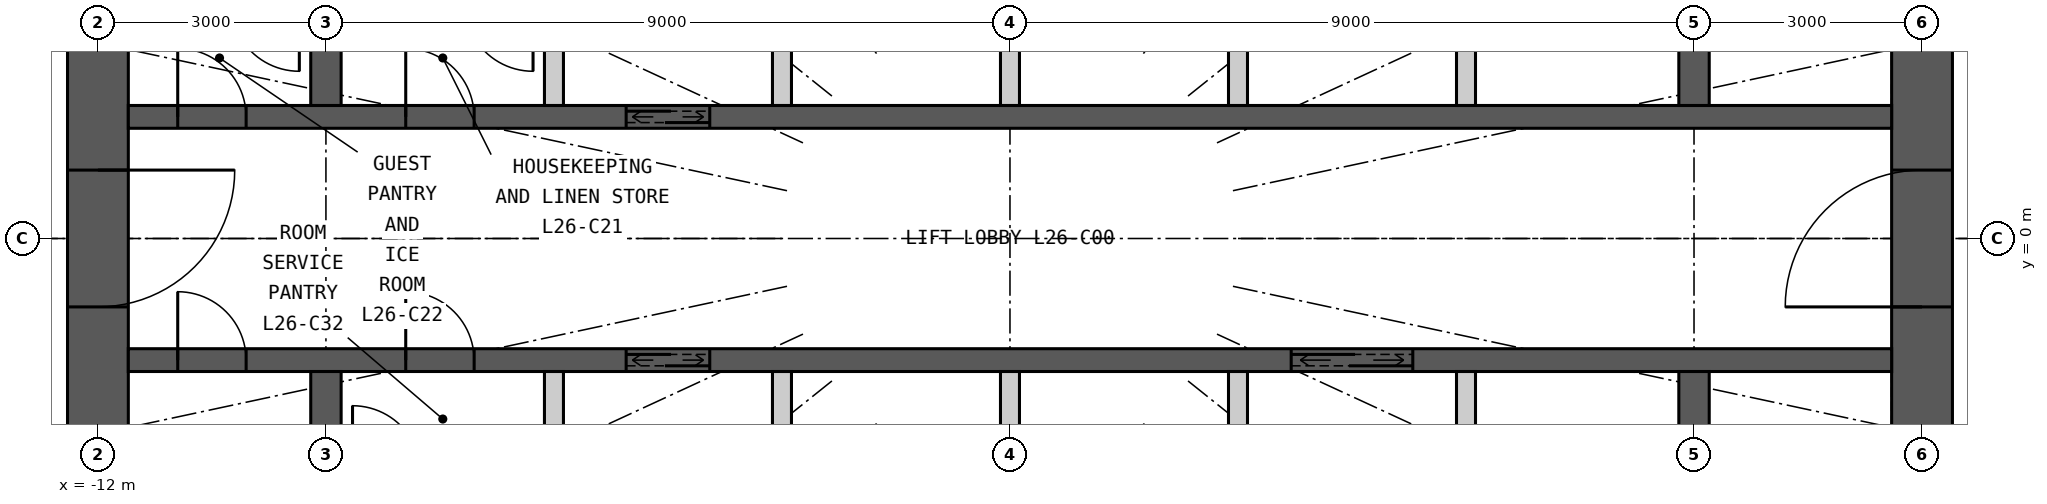
"""IFC4 building model, lengths in metres.
Left out: names, types, materials, properties, quantities, classifications, styles, units other than length and angle.
Written with IfcOpenShell. Run it as: python <this file> out.ifc"""

import sys

from ifc_helpers import new_model, si_unit, direction, frame, frame_2d, origin, place, context, subcontext, project, spatial, rectangle, extrude, element, fill, save


model = new_model("IFC4")
c1 = context("Model", 3, precision=1e-05, world=origin(), true_north=direction((0.0, 1.0)))
c2 = subcontext(c1, "Body", "Model", "MODEL_VIEW")
j1 = project(units=[si_unit("LENGTHUNIT", "METRE"), si_unit("PLANEANGLEUNIT", "RADIAN")], contexts=[c1])
p1 = place(None, origin())
s1 = spatial("IfcSite", under=j1, at=p1, CompositionType="ELEMENT")
p2 = place(p1, origin())
s2 = spatial("IfcBuilding", under=s1, at=p2, CompositionType="ELEMENT")
p3 = place(p2, frame((0.0, 0.0, 105.6)))
s3 = spatial("IfcBuildingStorey", under=s2, at=p3, CompositionType="ELEMENT", Elevation=105.6)
p4 = place(p3, frame((12.0, -7.6, 0.0), z_axis=(0.0, 0.0, 1.0), x_axis=(0.0, 1.0, 0.0)))
e1 = element("IfcWall", 1, at=p4, inside=s3, PredefinedType="SHEAR", context=c2, shape_type="SweptSolid", body=[
    extrude(rectangle(XDim=15.2, YDim=0.8, at=frame_2d((7.6, 0.0))), origin(), (0.0, 0.0, 1.0), 3.3),
])
p5 = place(p4, frame((6.7, 0.0, 0.0)))
e2 = element("IfcOpeningElement", 2, at=p5, cuts=e1, PredefinedType="OPENING", context=c2, shape_type="SweptSolid", body=[
    extrude(rectangle(XDim=1.8, YDim=2.2, at=frame_2d((0.9, 1.1))), frame((0.0, 0.41, 0.0), z_axis=(0.0, -1.0, 0.0), x_axis=(1.0, 0.0, 0.0)), (0.0, 0.0, 1.0), 0.82),
])
p6 = place(p3, frame((-12.0, 7.6, 0.0), z_axis=(0.0, 0.0, 1.0), x_axis=(0.0, -1.0, 0.0)))
e3 = element("IfcWall", 3, at=p6, inside=s3, PredefinedType="SHEAR", context=c2, shape_type="SweptSolid", body=[
    extrude(rectangle(XDim=15.2, YDim=0.8, at=frame_2d((7.6, 0.0))), origin(), (0.0, 0.0, 1.0), 3.3),
])
p7 = place(p6, frame((6.7, 0.0, 0.0)))
e4 = element("IfcOpeningElement", 4, at=p7, cuts=e3, PredefinedType="OPENING", context=c2, shape_type="SweptSolid", body=[
    extrude(rectangle(XDim=1.8, YDim=2.2, at=frame_2d((0.9, 1.1))), frame((0.0, 0.41, 0.0), z_axis=(0.0, -1.0, 0.0), x_axis=(1.0, 0.0, 0.0)), (0.0, 0.0, 1.0), 0.82),
])
p8 = place(p3, frame((-11.6, 1.6, 0.0), z_axis=(0.0, 0.0, 1.0), x_axis=(1.0, 0.0, 0.0)))
e5 = element("IfcWall", 5, at=p8, inside=s3, PredefinedType="SHEAR", context=c2, shape_type="SweptSolid", body=[
    extrude(rectangle(XDim=23.2, YDim=0.3, at=frame_2d((11.6, 0.0))), origin(), (0.0, 0.0, 1.0), 3.3),
])
p9 = place(p8, frame((6.55, 0.0, 0.0)))
e6 = element("IfcOpeningElement", 6, at=p9, cuts=e5, PredefinedType="OPENING", context=c2, shape_type="SweptSolid", body=[
    extrude(rectangle(XDim=1.1, YDim=2.2, at=frame_2d((0.55, 1.1))), frame((0.0, 0.16, 0.0), z_axis=(0.0, -1.0, 0.0), x_axis=(1.0, 0.0, 0.0)), (0.0, 0.0, 1.0), 0.32),
])
p10 = place(p8, frame((3.65, 0.0, 0.0)))
e7 = element("IfcOpeningElement", 7, at=p10, cuts=e5, PredefinedType="OPENING", context=c2, shape_type="SweptSolid", body=[
    extrude(rectangle(XDim=0.9, YDim=2.2, at=frame_2d((0.45, 1.1))), frame((0.0, 0.16, 0.0), z_axis=(0.0, -1.0, 0.0), x_axis=(1.0, 0.0, 0.0)), (0.0, 0.0, 1.0), 0.32),
])
p11 = place(p8, frame((0.65, 0.0, 0.0)))
e8 = element("IfcOpeningElement", 8, at=p11, cuts=e5, PredefinedType="OPENING", context=c2, shape_type="SweptSolid", body=[
    extrude(rectangle(XDim=0.9, YDim=2.2, at=frame_2d((0.45, 1.1))), frame((0.0, 0.16, 0.0), z_axis=(0.0, -1.0, 0.0), x_axis=(1.0, 0.0, 0.0)), (0.0, 0.0, 1.0), 0.32),
])
p12 = place(p3, frame((-11.6, -1.6, 0.0), z_axis=(0.0, 0.0, 1.0), x_axis=(1.0, 0.0, 0.0)))
e9 = element("IfcWall", 9, at=p12, inside=s3, PredefinedType="SHEAR", context=c2, shape_type="SweptSolid", body=[
    extrude(rectangle(XDim=23.2, YDim=0.3, at=frame_2d((11.6, 0.0))), origin(), (0.0, 0.0, 1.0), 3.3),
])
p13 = place(p12, frame((6.55, 0.0, 0.0)))
e10 = element("IfcOpeningElement", 10, at=p13, cuts=e9, PredefinedType="OPENING", context=c2, shape_type="SweptSolid", body=[
    extrude(rectangle(XDim=1.1, YDim=2.2, at=frame_2d((0.55, 1.1))), frame((0.0, 0.16, 0.0), z_axis=(0.0, -1.0, 0.0), x_axis=(1.0, 0.0, 0.0)), (0.0, 0.0, 1.0), 0.32),
])
p14 = place(p12, frame((15.3, 0.0, 0.0)))
e11 = element("IfcOpeningElement", 11, at=p14, cuts=e9, PredefinedType="OPENING", context=c2, shape_type="SweptSolid", body=[
    extrude(rectangle(XDim=1.6, YDim=2.4, at=frame_2d((0.8, 1.2))), frame((0.0, 0.16, 0.0), z_axis=(0.0, -1.0, 0.0), x_axis=(1.0, 0.0, 0.0)), (0.0, 0.0, 1.0), 0.32),
])
p15 = place(p12, frame((0.65, 0.0, 0.0)))
e12 = element("IfcOpeningElement", 12, at=p15, cuts=e9, PredefinedType="OPENING", context=c2, shape_type="SweptSolid", body=[
    extrude(rectangle(XDim=0.9, YDim=2.2, at=frame_2d((0.45, 1.1))), frame((0.0, 0.16, 0.0), z_axis=(0.0, -1.0, 0.0), x_axis=(1.0, 0.0, 0.0)), (0.0, 0.0, 1.0), 0.32),
])
p16 = place(p12, frame((3.65, 0.0, 0.0)))
e13 = element("IfcOpeningElement", 13, at=p16, cuts=e9, PredefinedType="OPENING", context=c2, shape_type="SweptSolid", body=[
    extrude(rectangle(XDim=0.9, YDim=2.2, at=frame_2d((0.45, 1.1))), frame((0.0, 0.16, 0.0), z_axis=(0.0, -1.0, 0.0), x_axis=(1.0, 0.0, 0.0)), (0.0, 0.0, 1.0), 0.32),
])
for number, where, z_axis, x_axis in (
    (14, (-9.0, 1.75, 0.0), (0.0, 0.0, 1.0), (0.0, 1.0, 0.0)),
    (15, (-9.0, -4.1, 0.0), (0.0, 0.0, 1.0), (0.0, 1.0, 0.0)),
    (16, (9.0, 1.75, 0.0), (0.0, 0.0, 1.0), (0.0, 1.0, 0.0)),
    (17, (9.0, -4.1, 0.0), (0.0, 0.0, 1.0), (0.0, 1.0, 0.0)),
):
    element("IfcWall", number, at=place(p3, frame(where, z_axis=z_axis, x_axis=x_axis)), inside=s3, PredefinedType="SHEAR", context=c2, shape_type="SweptSolid", body=[
        extrude(rectangle(XDim=2.35, YDim=0.4, at=frame_2d((1.175, 0.0))), origin(), (0.0, 0.0, 1.0), 3.3),
    ])
for number, where, z_axis, x_axis in (
    (18, (-6.0, 1.75, 0.0), (0.0, 0.0, 1.0), (0.0, 1.0, 0.0)),
    (19, (-3.0, 1.75, 0.0), (0.0, 0.0, 1.0), (0.0, 1.0, 0.0)),
    (20, (0.0, 1.75, 0.0), (0.0, 0.0, 1.0), (0.0, 1.0, 0.0)),
    (21, (3.0, 1.75, 0.0), (0.0, 0.0, 1.0), (0.0, 1.0, 0.0)),
    (22, (6.0, 1.75, 0.0), (0.0, 0.0, 1.0), (0.0, 1.0, 0.0)),
    (23, (-6.0, -4.1, 0.0), (0.0, 0.0, 1.0), (0.0, 1.0, 0.0)),
    (24, (-3.0, -4.1, 0.0), (0.0, 0.0, 1.0), (0.0, 1.0, 0.0)),
    (25, (0.0, -4.1, 0.0), (0.0, 0.0, 1.0), (0.0, 1.0, 0.0)),
    (26, (3.0, -4.1, 0.0), (0.0, 0.0, 1.0), (0.0, 1.0, 0.0)),
    (27, (6.0, -4.1, 0.0), (0.0, 0.0, 1.0), (0.0, 1.0, 0.0)),
):
    element("IfcWall", number, at=place(p3, frame(where, z_axis=z_axis, x_axis=x_axis)), inside=s3, PredefinedType="PARTITIONING", context=c2, shape_type="SweptSolid", body=[
        extrude(rectangle(XDim=2.35, YDim=0.25, at=frame_2d((1.175, 0.0))), origin(), (0.0, 0.0, 1.0), 3.3),
    ])
p17 = place(p9, origin())
e28 = element("IfcDoor", 28, at=p17, inside=s3, OperationType="DOUBLE_DOOR_SLIDING", PredefinedType="DOOR", context=c2, shape_type="SweptSolid", body=[
    extrude(rectangle(XDim=1.1, YDim=2.2, at=frame_2d((0.55, 1.1))), frame((0.0, 0.025, 0.0), z_axis=(0.0, -1.0, 0.0), x_axis=(1.0, 0.0, 0.0)), (0.0, 0.0, 1.0), 0.05),
])
fill(e6, e28)
p18 = place(p13, origin())
e29 = element("IfcDoor", 29, at=p18, inside=s3, OperationType="DOUBLE_DOOR_SLIDING", PredefinedType="DOOR", context=c2, shape_type="SweptSolid", body=[
    extrude(rectangle(XDim=1.1, YDim=2.2, at=frame_2d((0.55, 1.1))), frame((0.0, 0.025, 0.0), z_axis=(0.0, -1.0, 0.0), x_axis=(1.0, 0.0, 0.0)), (0.0, 0.0, 1.0), 0.05),
])
fill(e10, e29)
p19 = place(p14, origin())
e30 = element("IfcDoor", 30, at=p19, inside=s3, OperationType="DOUBLE_DOOR_SLIDING", PredefinedType="DOOR", context=c2, shape_type="SweptSolid", body=[
    extrude(rectangle(XDim=1.6, YDim=2.4, at=frame_2d((0.8, 1.2))), frame((0.0, 0.025, 0.0), z_axis=(0.0, -1.0, 0.0), x_axis=(1.0, 0.0, 0.0)), (0.0, 0.0, 1.0), 0.05),
])
fill(e11, e30)
p20 = place(p10, origin())
e31 = element("IfcDoor", 31, at=p20, inside=s3, OperationType="SINGLE_SWING_LEFT", PredefinedType="DOOR", context=c2, shape_type="SweptSolid", body=[
    extrude(rectangle(XDim=0.9, YDim=2.2, at=frame_2d((0.45, 1.1))), frame((0.0, 0.025, 0.0), z_axis=(0.0, -1.0, 0.0), x_axis=(1.0, 0.0, 0.0)), (0.0, 0.0, 1.0), 0.05),
])
fill(e7, e31)
p21 = place(p15, origin())
e32 = element("IfcDoor", 32, at=p21, inside=s3, OperationType="SINGLE_SWING_LEFT", PredefinedType="DOOR", context=c2, shape_type="SweptSolid", body=[
    extrude(rectangle(XDim=0.9, YDim=2.2, at=frame_2d((0.45, 1.1))), frame((0.0, 0.025, 0.0), z_axis=(0.0, -1.0, 0.0), x_axis=(1.0, 0.0, 0.0)), (0.0, 0.0, 1.0), 0.05),
])
fill(e12, e32)
p22 = place(p16, origin())
e33 = element("IfcDoor", 33, at=p22, inside=s3, OperationType="SINGLE_SWING_LEFT", PredefinedType="DOOR", context=c2, shape_type="SweptSolid", body=[
    extrude(rectangle(XDim=0.9, YDim=2.2, at=frame_2d((0.45, 1.1))), frame((0.0, 0.025, 0.0), z_axis=(0.0, -1.0, 0.0), x_axis=(1.0, 0.0, 0.0)), (0.0, 0.0, 1.0), 0.05),
])
fill(e13, e33)
p23 = place(p11, origin())
e34 = element("IfcDoor", 34, at=p23, inside=s3, OperationType="SINGLE_SWING_LEFT", PredefinedType="DOOR", context=c2, shape_type="SweptSolid", body=[
    extrude(rectangle(XDim=0.9, YDim=2.2, at=frame_2d((0.45, 1.1))), frame((0.0, 0.025, 0.0), z_axis=(0.0, -1.0, 0.0), x_axis=(1.0, 0.0, 0.0)), (0.0, 0.0, 1.0), 0.05),
])
fill(e8, e34)
p24 = place(p5, origin())
e35 = element("IfcDoor", 35, at=p24, inside=s3, OperationType="DOUBLE_DOOR_DOUBLE_SWING", PredefinedType="DOOR", context=c2, shape_type="SweptSolid", body=[
    extrude(rectangle(XDim=1.8, YDim=2.2, at=frame_2d((0.9, 1.1))), frame((0.0, 0.025, 0.0), z_axis=(0.0, -1.0, 0.0), x_axis=(1.0, 0.0, 0.0)), (0.0, 0.0, 1.0), 0.05),
])
fill(e2, e35)
p25 = place(p7, origin())
e36 = element("IfcDoor", 36, at=p25, inside=s3, OperationType="DOUBLE_DOOR_DOUBLE_SWING", PredefinedType="DOOR", context=c2, shape_type="SweptSolid", body=[
    extrude(rectangle(XDim=1.8, YDim=2.2, at=frame_2d((0.9, 1.1))), frame((0.0, 0.025, 0.0), z_axis=(0.0, -1.0, 0.0), x_axis=(1.0, 0.0, 0.0)), (0.0, 0.0, 1.0), 0.05),
])
fill(e4, e36)
save(model, sys.argv[1])
